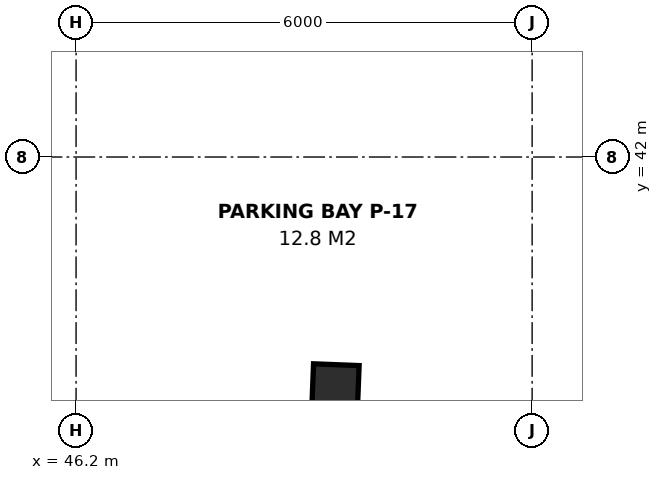
"""IFC4 building model, lengths in metres.
Left out: names, types, materials, properties, quantities, classifications, styles, units other than length and angle.
Written with IfcOpenShell. Run it as: python <this file> out.ifc"""

import sys

from ifc_helpers import new_model, si_unit, direction, frame, origin, origin_2d, place, context, subcontext, project, spatial, circle, extrude, element, save


model = new_model("IFC4")
c1 = context("Model", 3, precision=1e-05, world=origin(), true_north=direction((0.0, 1.0)))
c2 = subcontext(c1, "Body", "Model", "MODEL_VIEW")
j1 = project(units=[si_unit("LENGTHUNIT", "METRE"), si_unit("PLANEANGLEUNIT", "RADIAN")], contexts=[c1])
p1 = place(None, origin())
s1 = spatial("IfcSite", under=j1, at=p1, CompositionType="ELEMENT")
p2 = place(p1, origin())
s2 = spatial("IfcBuilding", under=s1, at=p2, CompositionType="ELEMENT")
p3 = place(p2, frame((0.0, 0.0, -4.2)))
s3 = spatial("IfcBuildingStorey", under=s2, at=p3, CompositionType="ELEMENT", Elevation=-4.2)
p4 = place(p3, frame((49.612, 38.968, 0.0), z_axis=(0.0, 0.0, 1.0), x_axis=(0.999256201254, -0.038562212782, 0.0)))
e1 = element("IfcColumn", 1, at=p4, inside=s3, PredefinedType="COLUMN", context=c2, shape_type="SweptSolid", body=[
    extrude(circle(Radius=0.3, at=origin_2d()), origin(), (0.0, 0.0, 1.0), 4.2),
])
save(model, sys.argv[1])
